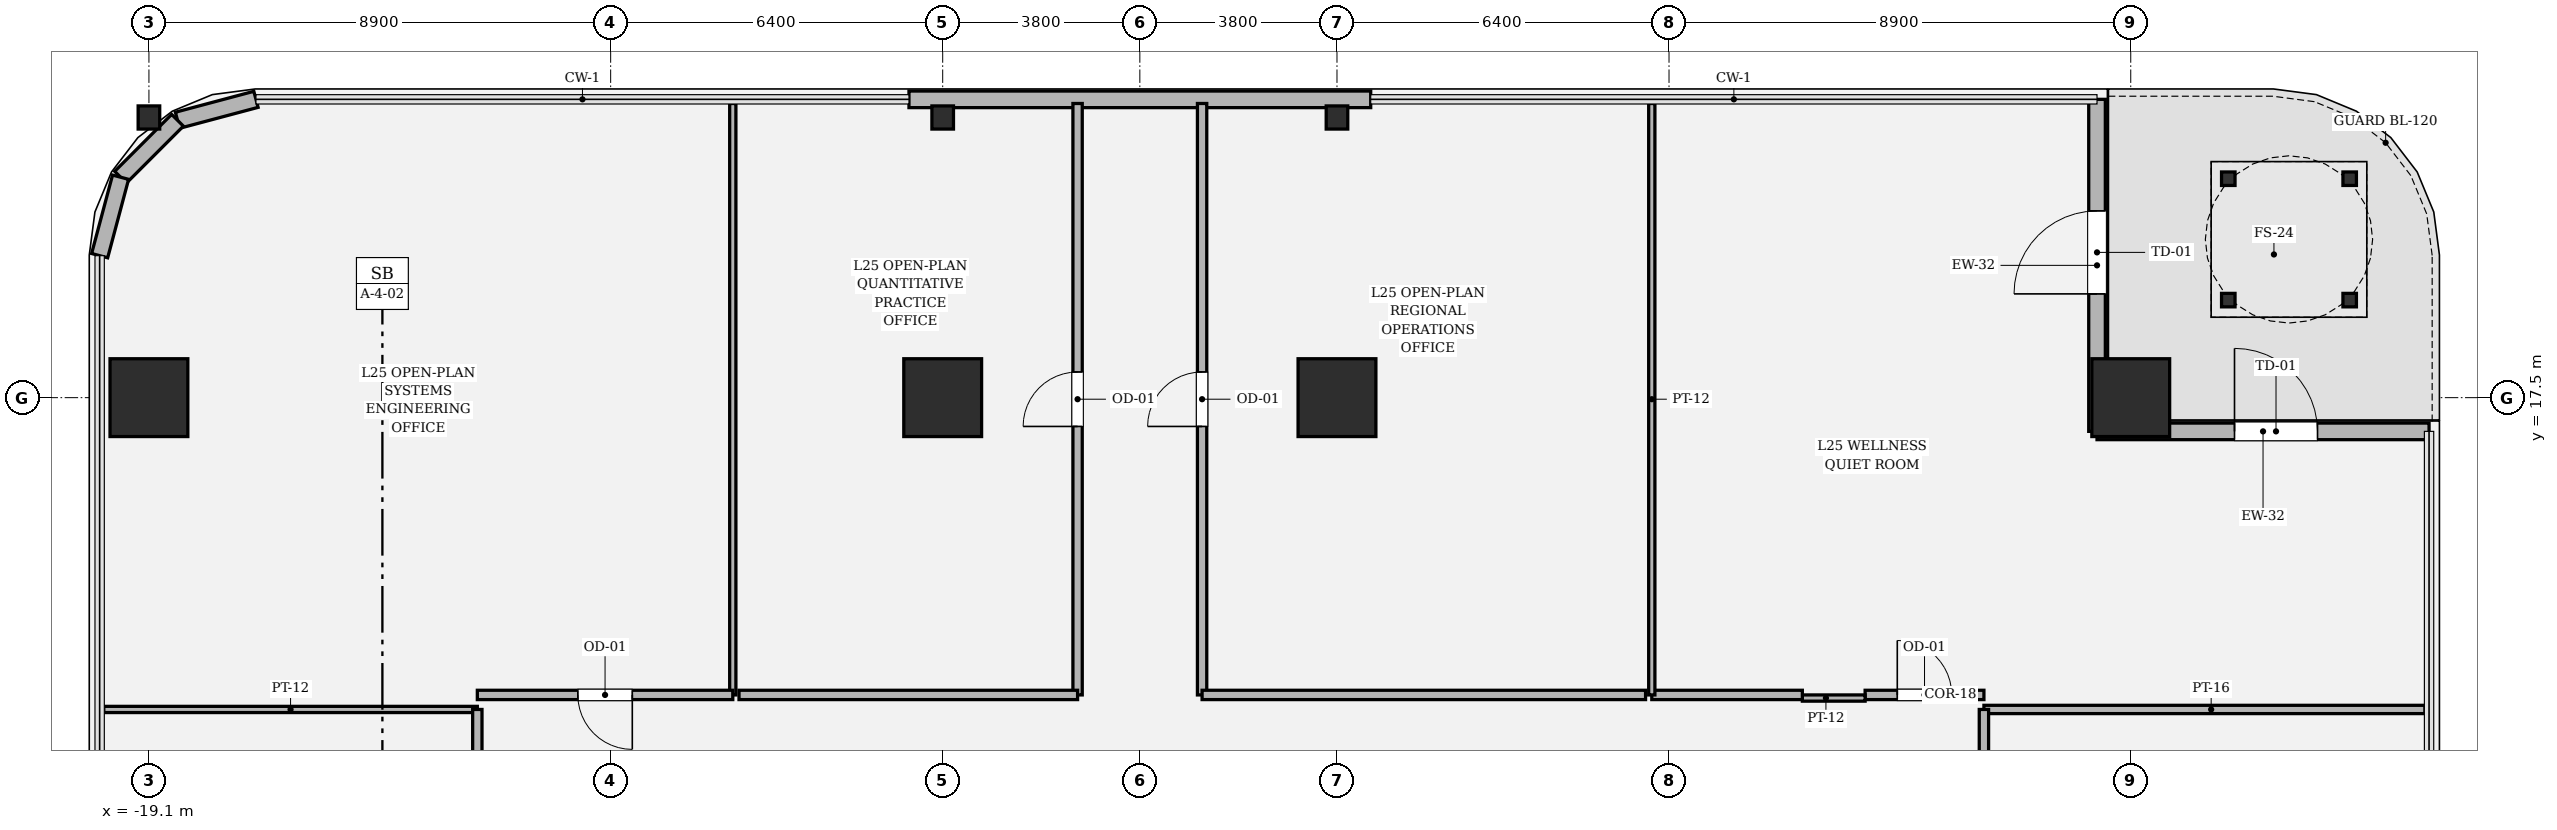
"""IFC4 building model, lengths in metres.
Left out: names, types, materials, properties, quantities, classifications, styles, units other than length and angle.
Written with IfcOpenShell. Run it as: python <this file> out.ifc"""

import sys

from ifc_helpers import new_model, si_unit, direction, frame, frame_2d, origin, origin_2d, place, context, subcontext, project, spatial, rectangle, hollow_rectangle, i_section, extrude, element, fill, save


model = new_model("IFC4")
c1 = context("Model", 3, precision=1e-05, world=origin(), true_north=direction((0.0, 1.0)))
c2 = subcontext(c1, "Body", "Model", "MODEL_VIEW")
j1 = project(units=[si_unit("LENGTHUNIT", "METRE"), si_unit("PLANEANGLEUNIT", "RADIAN")], contexts=[c1])
p1 = place(None, origin())
s1 = spatial("IfcSite", under=j1, at=p1, CompositionType="ELEMENT")
p2 = place(p1, origin())
s2 = spatial("IfcBuilding", under=s1, at=p2, CompositionType="ELEMENT")
p3 = place(p2, frame((0.0, 0.0, 109.2)))
s3 = spatial("IfcBuildingStorey", under=s2, at=p3, CompositionType="ELEMENT", Elevation=109.2)
for number, where, z_axis, x_axis in (
    (1, (19.1, 17.5, 0.0), (0.0, 0.0, 1.0), (1.0, 0.0, 0.0)),
    (2, (3.8, 17.5, 0.0), (0.0, 0.0, 1.0), (1.0, 0.0, 0.0)),
    (3, (-3.8, 17.5, 0.0), (0.0, 0.0, 1.0), (1.0, 0.0, 0.0)),
    (4, (-19.1, 17.5, 0.0), (0.0, 0.0, 1.0), (1.0, 0.0, 0.0)),
):
    element("IfcColumn", number, at=place(p3, frame(where, z_axis=z_axis, x_axis=x_axis)), inside=s3, PredefinedType="COLUMN", context=c2, shape_type="SweptSolid", body=[
        extrude(hollow_rectangle(XDim=1.5, YDim=1.5, WallThickness=0.045, at=origin_2d()), origin(), (0.0, 0.0, 1.0), 4.05),
    ])
for number, where, z_axis, x_axis in (
    (5, (-19.1, 22.9, 0.0), (0.0, 0.0, 1.0), (1.0, 0.0, 0.0)),
    (6, (-3.8, 22.9, 0.0), (0.0, 0.0, 1.0), (1.0, 0.0, 0.0)),
    (7, (3.8, 22.9, 0.0), (0.0, 0.0, 1.0), (1.0, 0.0, 0.0)),
):
    element("IfcColumn", number, at=place(p3, frame(where, z_axis=z_axis, x_axis=x_axis)), inside=s3, PredefinedType="COLUMN", context=c2, shape_type="SweptSolid", body=[
        extrude(i_section(OverallWidth=0.416, OverallDepth=0.446, WebThickness=0.039, FlangeThickness=0.062, FilletRadius=0.018, at=origin_2d()), origin(), (0.0, 0.0, 1.0), 4.048),
    ])
p4 = place(p3, frame((24.85, 16.85, 0.0), z_axis=(0.0, 0.0, 1.0), x_axis=(-1.0, 0.0, 0.0)))
e8 = element("IfcWall", 8, at=p4, inside=s3, PredefinedType="SOLIDWALL", context=c2, shape_type="SweptSolid", body=[
    extrude(rectangle(XDim=6.4, YDim=0.32, at=frame_2d((3.2, 0.0))), origin(), (0.0, 0.0, 1.0), 3.104),
])
p5 = place(p4, frame((2.15, 0.0, 0.0)))
e9 = element("IfcOpeningElement", 9, at=p5, cuts=e8, PredefinedType="OPENING", context=c2, shape_type="SweptSolid", body=[
    extrude(rectangle(XDim=1.6, YDim=2.35, at=frame_2d((0.8, 1.175))), frame((0.0, 0.17, 0.0), z_axis=(0.0, -1.0, 0.0), x_axis=(1.0, 0.0, 0.0)), (0.0, 0.0, 1.0), 0.34),
])
p6 = place(p3, frame((18.45, 16.85, 0.0), z_axis=(0.0, 0.0, 1.0), x_axis=(0.0, 1.0, 0.0)))
e10 = element("IfcWall", 10, at=p6, inside=s3, PredefinedType="SOLIDWALL", context=c2, shape_type="SweptSolid", body=[
    extrude(rectangle(XDim=6.4, YDim=0.32, at=frame_2d((3.2, 0.0))), origin(), (0.0, 0.0, 1.0), 3.104),
])
p7 = place(p6, frame((2.65, 0.0, 0.0)))
e11 = element("IfcOpeningElement", 11, at=p7, cuts=e10, PredefinedType="OPENING", context=c2, shape_type="SweptSolid", body=[
    extrude(rectangle(XDim=1.6, YDim=2.35, at=frame_2d((0.8, 1.175))), frame((0.0, 0.17, 0.0), z_axis=(0.0, -1.0, 0.0), x_axis=(1.0, 0.0, 0.0)), (0.0, 0.0, 1.0), 0.34),
])
p8 = place(p3, frame((4.45, 23.25, 0.0), z_axis=(0.0, 0.0, 1.0), x_axis=(-1.0, 0.0, 0.0)))
e12 = element("IfcWall", 12, at=p8, inside=s3, PredefinedType="SOLIDWALL", context=c2, shape_type="SweptSolid", body=[
    extrude(rectangle(XDim=8.9, YDim=0.32, at=frame_2d((4.45, 0.0))), origin(), (0.0, 0.0, 1.0), 2.524),
])
p9 = place(p3, frame((-17.037, 23.25, 0.0), z_axis=(0.0, 0.0, 1.0), x_axis=(-0.966224582397, -0.257701486942, 0.0)))
e13 = element("IfcWall", 13, at=p9, inside=s3, PredefinedType="SOLIDWALL", context=c2, shape_type="SweptSolid", body=[
    extrude(rectangle(XDim=1.565, YDim=0.32, at=frame_2d((0.783, 0.0))), origin(), (0.0, 0.0, 1.0), 2.524),
])
p10 = place(p3, frame((-18.549, 22.847, 0.0), z_axis=(0.0, 0.0, 1.0), x_axis=(-0.707028130747, -0.707185422879, 0.0)))
e14 = element("IfcWall", 14, at=p10, inside=s3, PredefinedType="SOLIDWALL", context=c2, shape_type="SweptSolid", body=[
    extrude(rectangle(XDim=1.552, YDim=0.32, at=frame_2d((0.776, 0.0))), origin(), (0.0, 0.0, 1.0), 2.484),
])
p11 = place(p3, frame((-19.646, 21.749, 0.0), z_axis=(0.0, 0.0, 1.0), x_axis=(-0.257847112249, -0.966185730957, 0.0)))
e15 = element("IfcWall", 15, at=p11, inside=s3, PredefinedType="SOLIDWALL", context=c2, shape_type="SweptSolid", body=[
    extrude(rectangle(XDim=1.565, YDim=0.32, at=frame_2d((0.783, 0.0))), origin(), (0.0, 0.0, 1.0), 3.81),
])
p12 = place(p3, frame((-19.97, 11.49, 0.0), z_axis=(0.0, 0.0, 1.0), x_axis=(1.0, 0.0, 0.0)))
e16 = element("IfcWall", 16, at=p12, inside=s3, PredefinedType="PARTITIONING", context=c2, shape_type="SweptSolid", body=[
    extrude(rectangle(XDim=7.2, YDim=0.12, at=frame_2d((3.6, 0.0))), origin(), (0.0, 0.0, 1.0), 3.104),
])
p13 = place(p3, frame((-12.77, 11.49, 0.0), z_axis=(0.0, 0.0, 1.0), x_axis=(0.0, -1.0, 0.0)))
e17 = element("IfcWall", 17, at=p13, inside=s3, PredefinedType="PARTITIONING", context=c2, shape_type="SweptSolid", body=[
    extrude(rectangle(XDim=14.664, YDim=0.18, at=frame_2d((7.332, 0.0))), origin(), (0.0, 0.0, 1.0), 3.104),
])
p14 = place(p13, frame((6.807, 0.0, 0.0)))
e18 = element("IfcOpeningElement", 18, at=p14, cuts=e17, PredefinedType="OPENING", context=c2, shape_type="SweptSolid", body=[
    extrude(rectangle(XDim=1.05, YDim=2.2, at=frame_2d((0.525, 1.1))), frame((0.0, 0.1, 0.0), z_axis=(0.0, -1.0, 0.0), x_axis=(1.0, 0.0, 0.0)), (0.0, 0.0, 1.0), 0.2),
])
p15 = place(p3, frame((16.27, 11.49, 0.0), z_axis=(0.0, 0.0, 1.0), x_axis=(1.0, 0.0, 0.0)))
e19 = element("IfcWall", 19, at=p15, inside=s3, PredefinedType="PARTITIONING", context=c2, shape_type="SweptSolid", body=[
    extrude(rectangle(XDim=8.5, YDim=0.16, at=frame_2d((4.25, 0.0))), origin(), (0.0, 0.0, 1.0), 3.104),
])
p16 = place(p3, frame((16.27, 0.06, 0.0), z_axis=(0.0, 0.0, 1.0), x_axis=(0.0, 1.0, 0.0)))
e20 = element("IfcWall", 20, at=p16, inside=s3, PredefinedType="PARTITIONING", context=c2, shape_type="SweptSolid", body=[
    extrude(rectangle(XDim=11.43, YDim=0.18, at=frame_2d((5.715, 0.0))), origin(), (0.0, 0.0, 1.0), 3.104),
])
p17 = place(p16, frame((5.19, 0.0, 0.0)))
e21 = element("IfcOpeningElement", 21, at=p17, cuts=e20, PredefinedType="OPENING", context=c2, shape_type="SweptSolid", body=[
    extrude(rectangle(XDim=1.05, YDim=2.2, at=frame_2d((0.525, 1.1))), frame((0.0, 0.1, 0.0), z_axis=(0.0, -1.0, 0.0), x_axis=(1.0, 0.0, 0.0)), (0.0, 0.0, 1.0), 0.2),
])
p18 = place(p3, frame((16.27, 11.77, 0.0), z_axis=(0.0, 0.0, 1.0), x_axis=(-1.0, 0.0, 0.0)))
e22 = element("IfcWall", 22, at=p18, inside=s3, PredefinedType="PARTITIONING", context=c2, shape_type="SweptSolid", body=[
    extrude(rectangle(XDim=2.29, YDim=0.18, at=frame_2d((1.145, 0.0))), origin(), (0.0, 0.0, 1.0), 3.354),
])
p19 = place(p18, frame((0.62, 0.0, 0.0)))
e23 = element("IfcOpeningElement", 23, at=p19, cuts=e22, PredefinedType="OPENING", context=c2, shape_type="SweptSolid", body=[
    extrude(rectangle(XDim=1.05, YDim=2.2, at=frame_2d((0.525, 1.1))), frame((0.0, 0.1, 0.0), z_axis=(0.0, -1.0, 0.0), x_axis=(1.0, 0.0, 0.0)), (0.0, 0.0, 1.0), 0.2),
])
p20 = place(p3, frame((13.98, 11.71, 0.0), z_axis=(0.0, 0.0, 1.0), x_axis=(-1.0, 0.0, 0.0)))
e24 = element("IfcWall", 24, at=p20, inside=s3, PredefinedType="PARTITIONING", context=c2, shape_type="SweptSolid", body=[
    extrude(rectangle(XDim=1.21, YDim=0.12, at=frame_2d((0.605, 0.0))), origin(), (0.0, 0.0, 1.0), 3.81),
])
p21 = place(p3, frame((12.77, 11.77, 0.0), z_axis=(0.0, 0.0, 1.0), x_axis=(-1.0, 0.0, 0.0)))
e25 = element("IfcWall", 25, at=p21, inside=s3, PredefinedType="PARTITIONING", context=c2, shape_type="SweptSolid", body=[
    extrude(rectangle(XDim=2.902, YDim=0.18, at=frame_2d((1.451, 0.0))), origin(), (0.0, 0.0, 1.0), 3.104),
])
p22 = place(p3, frame((9.868, 11.77, 0.0), z_axis=(0.0, 0.0, 1.0), x_axis=(0.0, 1.0, 0.0)))
e26 = element("IfcWall", 26, at=p22, inside=s3, PredefinedType="PARTITIONING", context=c2, shape_type="SweptSolid", body=[
    extrude(rectangle(XDim=11.4, YDim=0.12, at=frame_2d((5.7, 0.0))), origin(), (0.0, 0.0, 1.0), 3.104),
])
p23 = place(p3, frame((-7.846, 23.17, 0.0), z_axis=(0.0, 0.0, 1.0), x_axis=(0.0, -1.0, 0.0)))
e27 = element("IfcWall", 27, at=p23, inside=s3, PredefinedType="PARTITIONING", context=c2, shape_type="SweptSolid", body=[
    extrude(rectangle(XDim=11.4, YDim=0.12, at=frame_2d((5.7, 0.0))), origin(), (0.0, 0.0, 1.0), 2.524),
])
p24 = place(p3, frame((-7.846, 11.77, 0.0), z_axis=(0.0, 0.0, 1.0), x_axis=(-1.0, 0.0, 0.0)))
e28 = element("IfcWall", 28, at=p24, inside=s3, PredefinedType="PARTITIONING", context=c2, shape_type="SweptSolid", body=[
    extrude(rectangle(XDim=4.924, YDim=0.18, at=frame_2d((2.462, 0.0))), origin(), (0.0, 0.0, 1.0), 3.104),
])
p25 = place(p24, frame((1.937, 0.0, 0.0)))
e29 = element("IfcOpeningElement", 29, at=p25, cuts=e28, PredefinedType="OPENING", context=c2, shape_type="SweptSolid", body=[
    extrude(rectangle(XDim=1.05, YDim=2.2, at=frame_2d((0.525, 1.1))), frame((0.0, 0.1, 0.0), z_axis=(0.0, -1.0, 0.0), x_axis=(1.0, 0.0, 0.0)), (0.0, 0.0, 1.0), 0.2),
])
p26 = place(p3, frame((-1.2, 23.17, 0.0), z_axis=(0.0, 0.0, 1.0), x_axis=(0.0, -1.0, 0.0)))
e30 = element("IfcWall", 30, at=p26, inside=s3, PredefinedType="PARTITIONING", context=c2, shape_type="SweptSolid", body=[
    extrude(rectangle(XDim=11.4, YDim=0.18, at=frame_2d((5.7, 0.0))), origin(), (0.0, 0.0, 1.0), 2.524),
])
p27 = place(p26, frame((5.175, 0.0, 0.0)))
e31 = element("IfcOpeningElement", 31, at=p27, cuts=e30, PredefinedType="OPENING", context=c2, shape_type="SweptSolid", body=[
    extrude(rectangle(XDim=1.05, YDim=2.2, at=frame_2d((0.525, 1.1))), frame((0.0, 0.1, 0.0), z_axis=(0.0, -1.0, 0.0), x_axis=(1.0, 0.0, 0.0)), (0.0, 0.0, 1.0), 0.2),
])
p28 = place(p3, frame((-1.2, 11.77, 0.0), z_axis=(0.0, 0.0, 1.0), x_axis=(-1.0, 0.0, 0.0)))
e32 = element("IfcWall", 32, at=p28, inside=s3, PredefinedType="PARTITIONING", context=c2, shape_type="SweptSolid", body=[
    extrude(rectangle(XDim=6.526, YDim=0.18, at=frame_2d((3.263, 0.0))), origin(), (0.0, 0.0, 1.0), 3.104),
])
p29 = place(p3, frame((1.2, 11.77, 0.0), z_axis=(0.0, 0.0, 1.0), x_axis=(0.0, 1.0, 0.0)))
e33 = element("IfcWall", 33, at=p29, inside=s3, PredefinedType="PARTITIONING", context=c2, shape_type="SweptSolid", body=[
    extrude(rectangle(XDim=11.4, YDim=0.18, at=frame_2d((5.7, 0.0))), origin(), (0.0, 0.0, 1.0), 2.524),
])
p30 = place(p29, frame((5.175, 0.0, 0.0)))
e34 = element("IfcOpeningElement", 34, at=p30, cuts=e33, PredefinedType="OPENING", context=c2, shape_type="SweptSolid", body=[
    extrude(rectangle(XDim=1.05, YDim=2.2, at=frame_2d((0.525, 1.1))), frame((0.0, 0.1, 0.0), z_axis=(0.0, -1.0, 0.0), x_axis=(1.0, 0.0, 0.0)), (0.0, 0.0, 1.0), 0.2),
])
p31 = place(p3, frame((9.748, 11.77, 0.0), z_axis=(0.0, 0.0, 1.0), x_axis=(-1.0, 0.0, 0.0)))
e35 = element("IfcWall", 35, at=p31, inside=s3, PredefinedType="PARTITIONING", context=c2, shape_type="SweptSolid", body=[
    extrude(rectangle(XDim=8.548, YDim=0.18, at=frame_2d((4.274, 0.0))), origin(), (0.0, 0.0, 1.0), 3.104),
])
p32 = place(p5, origin())
e36 = element("IfcDoor", 36, at=p32, inside=s3, OperationType="SINGLE_SWING_RIGHT", PredefinedType="DOOR", context=c2, shape_type="SweptSolid", body=[
    extrude(rectangle(XDim=1.6, YDim=2.35, at=frame_2d((0.8, 1.175))), frame((0.0, 0.025, 0.0), z_axis=(0.0, -1.0, 0.0), x_axis=(1.0, 0.0, 0.0)), (0.0, 0.0, 1.0), 0.05),
])
fill(e9, e36)
p33 = place(p7, origin())
e37 = element("IfcDoor", 37, at=p33, inside=s3, OperationType="SINGLE_SWING_LEFT", PredefinedType="DOOR", context=c2, shape_type="SweptSolid", body=[
    extrude(rectangle(XDim=1.6, YDim=2.35, at=frame_2d((0.8, 1.175))), frame((0.0, 0.025, 0.0), z_axis=(0.0, -1.0, 0.0), x_axis=(1.0, 0.0, 0.0)), (0.0, 0.0, 1.0), 0.05),
])
fill(e11, e37)
p34 = place(p19, origin())
e38 = element("IfcDoor", 38, at=p34, inside=s3, OperationType="SINGLE_SWING_RIGHT", PredefinedType="DOOR", context=c2, shape_type="SweptSolid", body=[
    extrude(rectangle(XDim=1.05, YDim=2.2, at=frame_2d((0.525, 1.1))), frame((0.0, 0.025, 0.0), z_axis=(0.0, -1.0, 0.0), x_axis=(1.0, 0.0, 0.0)), (0.0, 0.0, 1.0), 0.05),
])
fill(e23, e38)
p35 = place(p25, origin())
e39 = element("IfcDoor", 39, at=p35, inside=s3, OperationType="SINGLE_SWING_LEFT", PredefinedType="DOOR", context=c2, shape_type="SweptSolid", body=[
    extrude(rectangle(XDim=1.05, YDim=2.2, at=frame_2d((0.525, 1.1))), frame((0.0, 0.025, 0.0), z_axis=(0.0, -1.0, 0.0), x_axis=(1.0, 0.0, 0.0)), (0.0, 0.0, 1.0), 0.05),
])
fill(e29, e39)
p36 = place(p27, origin())
e40 = element("IfcDoor", 40, at=p36, inside=s3, OperationType="SINGLE_SWING_RIGHT", PredefinedType="DOOR", context=c2, shape_type="SweptSolid", body=[
    extrude(rectangle(XDim=1.05, YDim=2.2, at=frame_2d((0.525, 1.1))), frame((0.0, 0.025, 0.0), z_axis=(0.0, -1.0, 0.0), x_axis=(1.0, 0.0, 0.0)), (0.0, 0.0, 1.0), 0.05),
])
fill(e31, e40)
p37 = place(p30, origin())
e41 = element("IfcDoor", 41, at=p37, inside=s3, OperationType="SINGLE_SWING_LEFT", PredefinedType="DOOR", context=c2, shape_type="SweptSolid", body=[
    extrude(rectangle(XDim=1.05, YDim=2.2, at=frame_2d((0.525, 1.1))), frame((0.0, 0.025, 0.0), z_axis=(0.0, -1.0, 0.0), x_axis=(1.0, 0.0, 0.0)), (0.0, 0.0, 1.0), 0.05),
])
fill(e34, e41)
save(model, sys.argv[1])
